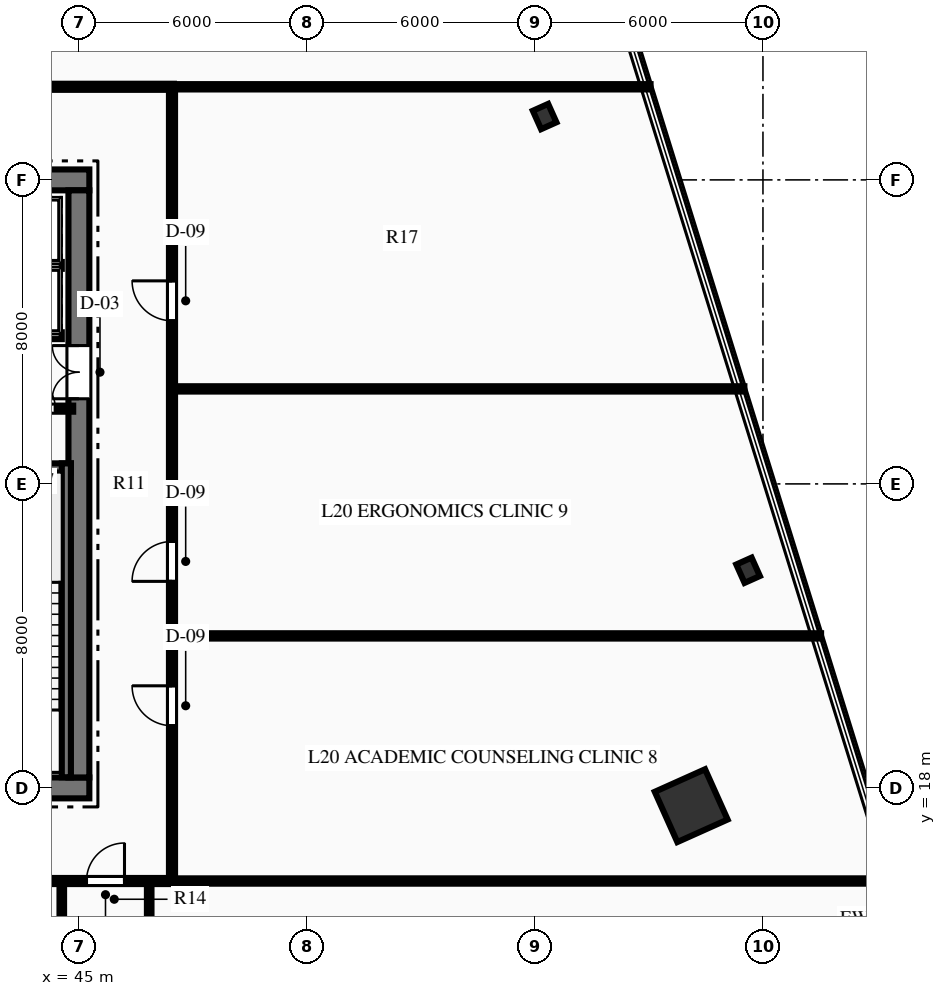
"""IFC4 building model, lengths in metres.
Left out: names, types, materials, properties, quantities, classifications, styles, units other than length and angle.
Written with IfcOpenShell. Run it as: python <this file> out.ifc"""

import sys

from ifc_helpers import new_model, si_unit, direction, frame, frame_2d, origin, origin_2d, place, context, subcontext, project, spatial, rectangle, hollow_rectangle, i_section, extrude, element, fill, save


model = new_model("IFC4")
c1 = context("Model", 3, precision=1e-05, world=origin(), true_north=direction((0.0, 1.0)))
c2 = subcontext(c1, "Body", "Model", "MODEL_VIEW")
j1 = project(units=[si_unit("LENGTHUNIT", "METRE"), si_unit("PLANEANGLEUNIT", "RADIAN")], contexts=[c1])
p1 = place(None, origin())
s1 = spatial("IfcSite", under=j1, at=p1, CompositionType="ELEMENT")
p2 = place(p1, origin())
s2 = spatial("IfcBuilding", under=s1, at=p2, CompositionType="ELEMENT")
p3 = place(p2, frame((0.0, 0.0, 85.95)))
s3 = spatial("IfcBuildingStorey", under=s2, at=p3, CompositionType="ELEMENT", Elevation=85.95)
p4 = place(p3, frame((26.725, 18.0, 0.0), z_axis=(0.0, 0.0, 1.0), x_axis=(1.0, 0.0, 0.0)))
e1 = element("IfcWall", 1, at=p4, inside=s3, PredefinedType="SHEAR", context=c2, shape_type="SweptSolid", body=[
    extrude(rectangle(XDim=18.55, YDim=0.55, at=frame_2d((9.275, 0.0))), origin(), (0.0, 0.0, 1.0), 4.5),
])
p5 = place(p4, frame((7.375, 0.0, 0.0)))
e2 = element("IfcOpeningElement", 2, at=p5, cuts=e1, PredefinedType="OPENING", context=c2, shape_type="SweptSolid", body=[
    extrude(rectangle(XDim=1.1, YDim=2.15, at=frame_2d((0.55, 1.075))), frame((0.0, 0.285, 0.0), z_axis=(0.0, -1.0, 0.0), x_axis=(1.0, 0.0, 0.0)), (0.0, 0.0, 1.0), 0.57),
])
p6 = place(p4, frame((10.075, 0.0, 0.0)))
e3 = element("IfcOpeningElement", 3, at=p6, cuts=e1, PredefinedType="OPENING", context=c2, shape_type="SweptSolid", body=[
    extrude(rectangle(XDim=1.1, YDim=2.15, at=frame_2d((0.55, 1.075))), frame((0.0, 0.285, 0.0), z_axis=(0.0, -1.0, 0.0), x_axis=(1.0, 0.0, 0.0)), (0.0, 0.0, 1.0), 0.57),
])
p7 = place(p3, frame((26.725, 34.0, 0.0), z_axis=(0.0, 0.0, 1.0), x_axis=(1.0, 0.0, 0.0)))
e4 = element("IfcWall", 4, at=p7, inside=s3, PredefinedType="SHEAR", context=c2, shape_type="SweptSolid", body=[
    extrude(rectangle(XDim=18.55, YDim=0.55, at=frame_2d((9.275, 0.0))), origin(), (0.0, 0.0, 1.0), 4.5),
])
p8 = place(p7, frame((1.24, 0.0, 0.0)))
e5 = element("IfcOpeningElement", 5, at=p8, cuts=e4, PredefinedType="OPENING", context=c2, shape_type="SweptSolid", body=[
    extrude(rectangle(XDim=1.1, YDim=2.15, at=frame_2d((0.55, 1.075))), frame((0.0, 0.285, 0.0), z_axis=(0.0, -1.0, 0.0), x_axis=(1.0, 0.0, 0.0)), (0.0, 0.0, 1.0), 0.57),
])
p9 = place(p7, frame((3.49, 0.0, 0.0)))
e6 = element("IfcOpeningElement", 6, at=p9, cuts=e4, PredefinedType="OPENING", context=c2, shape_type="SweptSolid", body=[
    extrude(rectangle(XDim=1.1, YDim=2.15, at=frame_2d((0.55, 1.075))), frame((0.0, 0.285, 0.0), z_axis=(0.0, -1.0, 0.0), x_axis=(1.0, 0.0, 0.0)), (0.0, 0.0, 1.0), 0.57),
])
p10 = place(p7, frame((13.96, 0.0, 0.0)))
e7 = element("IfcOpeningElement", 7, at=p10, cuts=e4, PredefinedType="OPENING", context=c2, shape_type="SweptSolid", body=[
    extrude(rectangle(XDim=1.1, YDim=2.15, at=frame_2d((0.55, 1.075))), frame((0.0, 0.285, 0.0), z_axis=(0.0, -1.0, 0.0), x_axis=(1.0, 0.0, 0.0)), (0.0, 0.0, 1.0), 0.57),
])
p11 = place(p7, frame((16.21, 0.0, 0.0)))
e8 = element("IfcOpeningElement", 8, at=p11, cuts=e4, PredefinedType="OPENING", context=c2, shape_type="SweptSolid", body=[
    extrude(rectangle(XDim=1.1, YDim=2.15, at=frame_2d((0.55, 1.075))), frame((0.0, 0.285, 0.0), z_axis=(0.0, -1.0, 0.0), x_axis=(1.0, 0.0, 0.0)), (0.0, 0.0, 1.0), 0.57),
])
p12 = place(p3, frame((45.0, 18.275, 0.0), z_axis=(0.0, 0.0, 1.0), x_axis=(0.0, 1.0, 0.0)))
e9 = element("IfcWall", 9, at=p12, inside=s3, PredefinedType="SHEAR", context=c2, shape_type="SweptSolid", body=[
    extrude(rectangle(XDim=15.45, YDim=0.55, at=frame_2d((7.725, 0.0))), origin(), (0.0, 0.0, 1.0), 4.5),
])
p13 = place(p12, frame((9.965, 0.0, 0.0)))
e10 = element("IfcOpeningElement", 10, at=p13, cuts=e9, PredefinedType="OPENING", context=c2, shape_type="SweptSolid", body=[
    extrude(rectangle(XDim=1.4, YDim=2.2, at=frame_2d((0.7, 1.1))), frame((0.0, 0.285, 0.0), z_axis=(0.0, -1.0, 0.0), x_axis=(1.0, 0.0, 0.0)), (0.0, 0.0, 1.0), 0.57),
])
p14 = place(p3, frame((40.81, 26.42, 0.0), z_axis=(0.0, 0.0, 1.0), x_axis=(1.0, 0.0, 0.0)))
e11 = element("IfcWall", 11, at=p14, inside=s3, PredefinedType="SHEAR", context=c2, shape_type="SweptSolid", body=[
    extrude(rectangle(XDim=3.98, YDim=0.24, at=frame_2d((1.99, 0.0))), origin(), (0.0, 0.0, 1.0), 4.5),
])
p15 = place(p3, frame((44.67, 18.28, 0.0), z_axis=(0.0, 0.0, 1.0), x_axis=(0.0, 1.0, 0.0)))
e12 = element("IfcWall", 12, at=p15, inside=s3, PredefinedType="SHEAR", context=c2, shape_type="SweptSolid", body=[
    extrude(rectangle(XDim=8.26, YDim=0.24, at=frame_2d((4.13, 0.0))), origin(), (0.0, 0.0, 1.0), 4.5),
])
p16 = place(p3, frame((61.112, 17.533, 0.0), z_axis=(0.0, 0.0, 1.0), x_axis=(0.912477494148, 0.409126902895, 0.0)))
e13 = element("IfcColumn", 13, at=p16, inside=s3, PredefinedType="COLUMN", context=c2, shape_type="SweptSolid", body=[
    extrude(hollow_rectangle(XDim=1.45, YDim=1.45, WallThickness=0.07, at=origin_2d()), origin(), (0.0, 0.0, 1.0), 4.5),
])
for number, where, z_axis, x_axis in (
    (14, (62.609, 23.727, 0.0), (0.0, 0.0, 1.0), (0.912, 0.409, 0.0)),
    (15, (57.255, 35.667, 0.0), (0.0, 0.0, 1.0), (0.912, 0.409, 0.0)),
):
    element("IfcColumn", number, at=place(p3, frame(where, z_axis=z_axis, x_axis=x_axis)), inside=s3, PredefinedType="COLUMN", context=c2, shape_type="SweptSolid", body=[
        extrude(i_section(OverallWidth=0.442, OverallDepth=0.531, WebThickness=0.066, FlangeThickness=0.106, at=origin_2d()), origin(), (0.0, 0.0, 1.0), 4.5),
    ])
p17 = place(p3, frame((40.8, 27.98, 0.0), z_axis=(0.0, 0.0, 1.0), x_axis=(1.0, 0.0, 0.0)))
e16 = element("IfcWall", 16, at=p17, inside=s3, PredefinedType="PARTITIONING", context=c2, shape_type="SweptSolid", body=[
    extrude(rectangle(XDim=4.05, YDim=0.16, at=frame_2d((2.025, 0.0))), origin(), (0.0, 0.0, 1.0), 4.2),
])
p18 = place(p17, frame((0.77, 0.0, 0.0)))
e17 = element("IfcOpeningElement", 17, at=p18, cuts=e16, PredefinedType="OPENING", context=c2, shape_type="SweptSolid", body=[
    extrude(rectangle(XDim=0.9, YDim=2.15, at=frame_2d((0.45, 1.075))), frame((0.0, 0.09, 0.0), z_axis=(0.0, -1.0, 0.0), x_axis=(1.0, 0.0, 0.0)), (0.0, 0.0, 1.0), 0.18),
])
p19 = place(p17, frame((2.68, 0.0, 0.0)))
e18 = element("IfcOpeningElement", 18, at=p19, cuts=e16, PredefinedType="OPENING", context=c2, shape_type="SweptSolid", body=[
    extrude(rectangle(XDim=0.9, YDim=2.15, at=frame_2d((0.45, 1.075))), frame((0.0, 0.09, 0.0), z_axis=(0.0, -1.0, 0.0), x_axis=(1.0, 0.0, 0.0)), (0.0, 0.0, 1.0), 0.18),
])
p20 = place(p3, frame((40.12, 29.9, 0.0), z_axis=(0.0, 0.0, 1.0), x_axis=(1.0, 0.0, 0.0)))
e19 = element("IfcWall", 19, at=p20, inside=s3, PredefinedType="PARTITIONING", context=c2, shape_type="SweptSolid", body=[
    extrude(rectangle(XDim=4.43, YDim=0.18, at=frame_2d((2.215, 0.0))), origin(), (0.0, 0.0, 1.0), 4.2),
])
p21 = place(p20, frame((0.565, 0.0, 0.0)))
e20 = element("IfcOpeningElement", 20, at=p21, cuts=e19, PredefinedType="OPENING", context=c2, shape_type="SweptSolid", body=[
    extrude(rectangle(XDim=1.1, YDim=2.15, at=frame_2d((0.55, 1.075))), frame((0.0, 0.1, 0.0), z_axis=(0.0, -1.0, 0.0), x_axis=(1.0, 0.0, 0.0)), (0.0, 0.0, 1.0), 0.2),
])
p22 = place(p20, frame((2.815, 0.0, 0.0)))
e21 = element("IfcOpeningElement", 21, at=p22, cuts=e19, PredefinedType="OPENING", context=c2, shape_type="SweptSolid", body=[
    extrude(rectangle(XDim=1.1, YDim=2.15, at=frame_2d((0.55, 1.075))), frame((0.0, 0.1, 0.0), z_axis=(0.0, -1.0, 0.0), x_axis=(1.0, 0.0, 0.0)), (0.0, 0.0, 1.0), 0.2),
])
p23 = place(p3, frame((40.12, 31.75, 0.0), z_axis=(0.0, 0.0, 1.0), x_axis=(1.0, 0.0, 0.0)))
e22 = element("IfcWall", 22, at=p23, inside=s3, PredefinedType="PARTITIONING", context=c2, shape_type="SweptSolid", body=[
    extrude(rectangle(XDim=4.43, YDim=0.18, at=frame_2d((2.215, 0.0))), origin(), (0.0, 0.0, 1.0), 4.2),
])
p24 = place(p3, frame((24.5, 15.55, 0.0), z_axis=(0.0, 0.0, 1.0), x_axis=(1.0, 0.0, 0.0)))
e23 = element("IfcWall", 23, at=p24, inside=s3, PredefinedType="PARTITIONING", context=c2, shape_type="SweptSolid", body=[
    extrude(rectangle(XDim=23.0, YDim=0.16, at=frame_2d((11.5, 0.0))), origin(), (0.0, 0.0, 1.0), 4.2),
])
p25 = place(p24, frame((16.15, 0.0, 0.0)))
e24 = element("IfcOpeningElement", 24, at=p25, cuts=e23, PredefinedType="OPENING", context=c2, shape_type="SweptSolid", body=[
    extrude(rectangle(XDim=0.9, YDim=2.15, at=frame_2d((0.45, 1.075))), frame((0.0, 0.09, 0.0), z_axis=(0.0, -1.0, 0.0), x_axis=(1.0, 0.0, 0.0)), (0.0, 0.0, 1.0), 0.18),
])
p26 = place(p24, frame((18.45, 0.0, 0.0)))
e25 = element("IfcOpeningElement", 25, at=p26, cuts=e23, PredefinedType="OPENING", context=c2, shape_type="SweptSolid", body=[
    extrude(rectangle(XDim=0.9, YDim=2.15, at=frame_2d((0.45, 1.075))), frame((0.0, 0.09, 0.0), z_axis=(0.0, -1.0, 0.0), x_axis=(1.0, 0.0, 0.0)), (0.0, 0.0, 1.0), 0.18),
])
p27 = place(p24, frame((20.7, 0.0, 0.0)))
e26 = element("IfcOpeningElement", 26, at=p27, cuts=e23, PredefinedType="OPENING", context=c2, shape_type="SweptSolid", body=[
    extrude(rectangle(XDim=1.0, YDim=2.15, at=frame_2d((0.5, 1.075))), frame((0.0, 0.09, 0.0), z_axis=(0.0, -1.0, 0.0), x_axis=(1.0, 0.0, 0.0)), (0.0, 0.0, 1.0), 0.18),
])
p28 = place(p24, frame((3.781, 0.0, 0.0)))
e27 = element("IfcOpeningElement", 27, at=p28, cuts=e23, PredefinedType="OPENING", context=c2, shape_type="SweptSolid", body=[
    extrude(rectangle(XDim=1.05, YDim=2.15, at=frame_2d((0.525, 1.075))), frame((0.0, 0.09, 0.0), z_axis=(0.0, -1.0, 0.0), x_axis=(1.0, 0.0, 0.0)), (0.0, 0.0, 1.0), 0.18),
])
p29 = place(p24, frame((8.373, 0.0, 0.0)))
e28 = element("IfcOpeningElement", 28, at=p29, cuts=e23, PredefinedType="OPENING", context=c2, shape_type="SweptSolid", body=[
    extrude(rectangle(XDim=1.05, YDim=2.15, at=frame_2d((0.525, 1.075))), frame((0.0, 0.09, 0.0), z_axis=(0.0, -1.0, 0.0), x_axis=(1.0, 0.0, 0.0)), (0.0, 0.0, 1.0), 0.18),
])
p30 = place(p3, frame((24.5, 36.45, 0.0), z_axis=(0.0, 0.0, 1.0), x_axis=(1.0, 0.0, 0.0)))
e29 = element("IfcWall", 29, at=p30, inside=s3, PredefinedType="PARTITIONING", context=c2, shape_type="SweptSolid", body=[
    extrude(rectangle(XDim=23.0, YDim=0.16, at=frame_2d((11.5, 0.0))), origin(), (0.0, 0.0, 1.0), 4.2),
])
p31 = place(p30, frame((0.53, 0.0, 0.0)))
e30 = element("IfcOpeningElement", 30, at=p31, cuts=e29, PredefinedType="OPENING", context=c2, shape_type="SweptSolid", body=[
    extrude(rectangle(XDim=1.05, YDim=2.15, at=frame_2d((0.525, 1.075))), frame((0.0, 0.09, 0.0), z_axis=(0.0, -1.0, 0.0), x_axis=(1.0, 0.0, 0.0)), (0.0, 0.0, 1.0), 0.18),
])
p32 = place(p30, frame((9.755, 0.0, 0.0)))
e31 = element("IfcOpeningElement", 31, at=p32, cuts=e29, PredefinedType="OPENING", context=c2, shape_type="SweptSolid", body=[
    extrude(rectangle(XDim=1.05, YDim=2.15, at=frame_2d((0.525, 1.075))), frame((0.0, 0.09, 0.0), z_axis=(0.0, -1.0, 0.0), x_axis=(1.0, 0.0, 0.0)), (0.0, 0.0, 1.0), 0.18),
])
p33 = place(p30, frame((16.129, 0.0, 0.0)))
e32 = element("IfcOpeningElement", 32, at=p33, cuts=e29, PredefinedType="OPENING", context=c2, shape_type="SweptSolid", body=[
    extrude(rectangle(XDim=1.05, YDim=2.15, at=frame_2d((0.525, 1.075))), frame((0.0, 0.09, 0.0), z_axis=(0.0, -1.0, 0.0), x_axis=(1.0, 0.0, 0.0)), (0.0, 0.0, 1.0), 0.18),
])
p34 = place(p3, frame((47.45, 15.55, 0.0), z_axis=(0.0, 0.0, 1.0), x_axis=(0.0, 1.0, 0.0)))
e33 = element("IfcWall", 33, at=p34, inside=s3, PredefinedType="PARTITIONING", context=c2, shape_type="SweptSolid", body=[
    extrude(rectangle(XDim=20.9, YDim=0.16, at=frame_2d((10.45, 0.0))), origin(), (0.0, 0.0, 1.0), 4.2),
])
p35 = place(p34, frame((4.087, 0.0, 0.0)))
e34 = element("IfcOpeningElement", 34, at=p35, cuts=e33, PredefinedType="OPENING", context=c2, shape_type="SweptSolid", body=[
    extrude(rectangle(XDim=1.05, YDim=2.15, at=frame_2d((0.525, 1.075))), frame((0.0, 0.09, 0.0), z_axis=(0.0, -1.0, 0.0), x_axis=(1.0, 0.0, 0.0)), (0.0, 0.0, 1.0), 0.18),
])
p36 = place(p34, frame((7.885, 0.0, 0.0)))
e35 = element("IfcOpeningElement", 35, at=p36, cuts=e33, PredefinedType="OPENING", context=c2, shape_type="SweptSolid", body=[
    extrude(rectangle(XDim=1.05, YDim=2.15, at=frame_2d((0.525, 1.075))), frame((0.0, 0.09, 0.0), z_axis=(0.0, -1.0, 0.0), x_axis=(1.0, 0.0, 0.0)), (0.0, 0.0, 1.0), 0.18),
])
p37 = place(p34, frame((14.743, 0.0, 0.0)))
e36 = element("IfcOpeningElement", 36, at=p37, cuts=e33, PredefinedType="OPENING", context=c2, shape_type="SweptSolid", body=[
    extrude(rectangle(XDim=1.05, YDim=2.15, at=frame_2d((0.525, 1.075))), frame((0.0, 0.09, 0.0), z_axis=(0.0, -1.0, 0.0), x_axis=(1.0, 0.0, 0.0)), (0.0, 0.0, 1.0), 0.18),
])
for number, where, z_axis, x_axis in (
    (37, (44.55, 11.65, 0.0), (0.0, 0.0, 1.0), (0.0, 1.0, 0.0)),
    (38, (46.85, 11.65, 0.0), (0.0, 0.0, 1.0), (0.0, 1.0, 0.0)),
):
    element("IfcWall", number, at=place(p3, frame(where, z_axis=z_axis, x_axis=x_axis)), inside=s3, PredefinedType="PARTITIONING", context=c2, shape_type="SweptSolid", body=[
        extrude(rectangle(XDim=3.9, YDim=0.12, at=frame_2d((1.95, 0.0))), origin(), (0.0, 0.0, 1.0), 4.2),
    ])
p38 = place(p3, frame((47.45, 15.55, 0.0), z_axis=(0.0, 0.0, 1.0), x_axis=(1.0, 0.0, 0.0)))
e39 = element("IfcWall", 39, at=p38, inside=s3, PredefinedType="PARTITIONING", context=c2, shape_type="SweptSolid", body=[
    extrude(rectangle(XDim=19.082, YDim=0.14, at=frame_2d((9.541, 0.0))), origin(), (0.0, 0.0, 1.0), 4.2),
])
p39 = place(p3, frame((47.45, 36.45, 0.0), z_axis=(0.0, 0.0, 1.0), x_axis=(1.0, 0.0, 0.0)))
e40 = element("IfcWall", 40, at=p39, inside=s3, PredefinedType="PARTITIONING", context=c2, shape_type="SweptSolid", body=[
    extrude(rectangle(XDim=12.593, YDim=0.14, at=frame_2d((6.296, 0.0))), origin(), (0.0, 0.0, 1.0), 4.2),
])
p40 = place(p3, frame((47.45, 22.0, 0.0), z_axis=(0.0, 0.0, 1.0), x_axis=(1.0, 0.0, 0.0)))
e41 = element("IfcWall", 41, at=p40, inside=s3, PredefinedType="PARTITIONING", context=c2, shape_type="SweptSolid", body=[
    extrude(rectangle(XDim=17.079, YDim=0.14, at=frame_2d((8.54, 0.0))), origin(), (0.0, 0.0, 1.0), 4.2),
])
p41 = place(p3, frame((47.45, 28.5, 0.0), z_axis=(0.0, 0.0, 1.0), x_axis=(1.0, 0.0, 0.0)))
e42 = element("IfcWall", 42, at=p41, inside=s3, PredefinedType="PARTITIONING", context=c2, shape_type="SweptSolid", body=[
    extrude(rectangle(XDim=15.061, YDim=0.14, at=frame_2d((7.531, 0.0))), origin(), (0.0, 0.0, 1.0), 4.2),
])
p42 = place(p19, origin())
e43 = element("IfcDoor", 43, at=p42, inside=s3, OperationType="SINGLE_SWING_LEFT", PredefinedType="DOOR", context=c2, shape_type="SweptSolid", body=[
    extrude(rectangle(XDim=0.9, YDim=2.15, at=frame_2d((0.45, 1.075))), frame((0.0, 0.025, 0.0), z_axis=(0.0, -1.0, 0.0), x_axis=(1.0, 0.0, 0.0)), (0.0, 0.0, 1.0), 0.05),
])
fill(e18, e43)
p43 = place(p13, origin())
e44 = element("IfcDoor", 44, at=p43, inside=s3, OperationType="DOUBLE_DOOR_SINGLE_SWING", PredefinedType="DOOR", context=c2, shape_type="SweptSolid", body=[
    extrude(rectangle(XDim=1.4, YDim=2.2, at=frame_2d((0.7, 1.1))), frame((0.0, 0.025, 0.0), z_axis=(0.0, -1.0, 0.0), x_axis=(1.0, 0.0, 0.0)), (0.0, 0.0, 1.0), 0.05),
])
fill(e10, e44)
p44 = place(p27, origin())
e45 = element("IfcDoor", 45, at=p44, inside=s3, OperationType="SINGLE_SWING_RIGHT", PredefinedType="DOOR", context=c2, shape_type="SweptSolid", body=[
    extrude(rectangle(XDim=1.0, YDim=2.15, at=frame_2d((0.5, 1.075))), frame((0.0, 0.025, 0.0), z_axis=(0.0, -1.0, 0.0), x_axis=(1.0, 0.0, 0.0)), (0.0, 0.0, 1.0), 0.05),
])
fill(e26, e45)
p45 = place(p35, origin())
e46 = element("IfcDoor", 46, at=p45, inside=s3, OperationType="SINGLE_SWING_RIGHT", PredefinedType="DOOR", context=c2, shape_type="SweptSolid", body=[
    extrude(rectangle(XDim=1.05, YDim=2.15, at=frame_2d((0.525, 1.075))), frame((0.0, 0.025, 0.0), z_axis=(0.0, -1.0, 0.0), x_axis=(1.0, 0.0, 0.0)), (0.0, 0.0, 1.0), 0.05),
])
fill(e34, e46)
p46 = place(p36, origin())
e47 = element("IfcDoor", 47, at=p46, inside=s3, OperationType="SINGLE_SWING_LEFT", PredefinedType="DOOR", context=c2, shape_type="SweptSolid", body=[
    extrude(rectangle(XDim=1.05, YDim=2.15, at=frame_2d((0.525, 1.075))), frame((0.0, 0.025, 0.0), z_axis=(0.0, -1.0, 0.0), x_axis=(1.0, 0.0, 0.0)), (0.0, 0.0, 1.0), 0.05),
])
fill(e35, e47)
p47 = place(p37, origin())
e48 = element("IfcDoor", 48, at=p47, inside=s3, OperationType="SINGLE_SWING_RIGHT", PredefinedType="DOOR", context=c2, shape_type="SweptSolid", body=[
    extrude(rectangle(XDim=1.05, YDim=2.15, at=frame_2d((0.525, 1.075))), frame((0.0, 0.025, 0.0), z_axis=(0.0, -1.0, 0.0), x_axis=(1.0, 0.0, 0.0)), (0.0, 0.0, 1.0), 0.05),
])
fill(e36, e48)
save(model, sys.argv[1])
